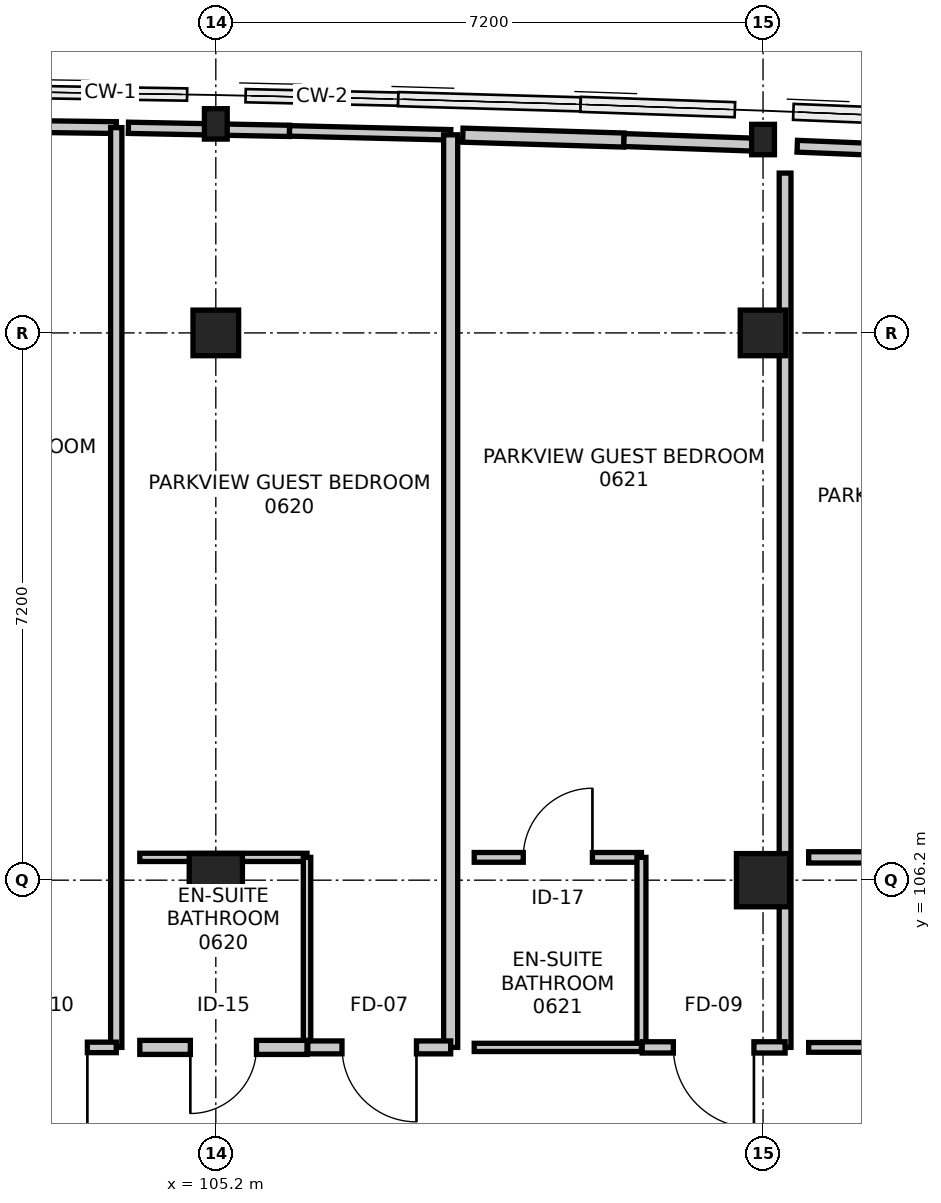
"""IFC4 building model, lengths in metres.
Left out: names, types, materials, properties, quantities, classifications, styles, units other than length and angle.
Written with IfcOpenShell. Run it as: python <this file> out.ifc"""

import sys

from ifc_helpers import new_model, si_unit, direction, frame, frame_2d, origin, origin_2d, place, context, subcontext, project, spatial, rectangle, i_section, extrude, element, fill, save


model = new_model("IFC4")
c1 = context("Model", 3, precision=1e-05, world=origin(), true_north=direction((0.0, 1.0)))
c2 = subcontext(c1, "Body", "Model", "MODEL_VIEW")
j1 = project(units=[si_unit("LENGTHUNIT", "METRE"), si_unit("PLANEANGLEUNIT", "RADIAN")], contexts=[c1])
p1 = place(None, origin())
s1 = spatial("IfcSite", under=j1, at=p1, CompositionType="ELEMENT")
p2 = place(p1, origin())
s2 = spatial("IfcBuilding", under=s1, at=p2, CompositionType="ELEMENT")
p3 = place(p2, frame((0.0, 0.0, 26.4)))
s3 = spatial("IfcBuildingStorey", under=s2, at=p3, CompositionType="ELEMENT", Elevation=26.4)
p4 = place(p3, frame((105.2, 106.2, 0.0), z_axis=(0.0, 0.0, 1.0), x_axis=(1.0, 0.0, 0.0)))
e1 = element("IfcColumn", 1, at=p4, inside=s3, PredefinedType="COLUMN", context=c2, shape_type="SweptSolid", body=[
    extrude(rectangle(XDim=0.7, YDim=0.7, at=origin_2d()), origin(), (0.0, 0.0, 1.0), 3.6),
])
p5 = place(p3, frame((105.2, 113.4, 0.0), z_axis=(0.0, 0.0, 1.0), x_axis=(1.0, 0.0, 0.0)))
e2 = element("IfcColumn", 2, at=p5, inside=s3, PredefinedType="COLUMN", context=c2, shape_type="SweptSolid", body=[
    extrude(rectangle(XDim=0.6, YDim=0.6, at=origin_2d()), origin(), (0.0, 0.0, 1.0), 3.6),
])
p6 = place(p3, frame((105.2, 116.15, 0.0), z_axis=(0.0, 0.0, 1.0), x_axis=(1.0, 0.0, 0.0)))
e3 = element("IfcColumn", 3, at=p6, inside=s3, PredefinedType="COLUMN", context=c2, shape_type="SweptSolid", body=[
    extrude(i_section(OverallWidth=0.3, OverallDepth=0.4, WebThickness=0.013, FlangeThickness=0.024, FilletRadius=0.027, at=origin_2d()), origin(), (0.0, 0.0, 1.0), 3.6),
])
p7 = place(p3, frame((112.4, 106.2, 0.0), z_axis=(0.0, 0.0, 1.0), x_axis=(1.0, 0.0, 0.0)))
e4 = element("IfcColumn", 4, at=p7, inside=s3, PredefinedType="COLUMN", context=c2, shape_type="SweptSolid", body=[
    extrude(rectangle(XDim=0.7, YDim=0.7, at=origin_2d()), origin(), (0.0, 0.0, 1.0), 3.6),
])
p8 = place(p3, frame((112.4, 113.4, 0.0), z_axis=(0.0, 0.0, 1.0), x_axis=(1.0, 0.0, 0.0)))
e5 = element("IfcColumn", 5, at=p8, inside=s3, PredefinedType="COLUMN", context=c2, shape_type="SweptSolid", body=[
    extrude(rectangle(XDim=0.6, YDim=0.6, at=origin_2d()), origin(), (0.0, 0.0, 1.0), 3.6),
])
p9 = place(p3, frame((112.4, 115.944, 0.0), z_axis=(0.0, 0.0, 1.0), x_axis=(1.0, 0.0, 0.0)))
e6 = element("IfcColumn", 6, at=p9, inside=s3, PredefinedType="COLUMN", context=c2, shape_type="SweptSolid", body=[
    extrude(i_section(OverallWidth=0.3, OverallDepth=0.4, WebThickness=0.013, FlangeThickness=0.024, FilletRadius=0.027, at=origin_2d()), origin(), (0.0, 0.0, 1.0), 3.6),
])
p10 = place(p3, frame((101.77, 116.129, 0.0), z_axis=(0.0, 0.0, 1.0), x_axis=(0.999915329499, -0.013012833379, 0.0)))
e7 = element("IfcWall", 7, at=p10, inside=s3, PredefinedType="PARTITIONING", context=c2, shape_type="SweptSolid", body=[
    extrude(rectangle(XDim=2.12, YDim=0.155, at=frame_2d((1.06, 0.0))), origin(), (0.0, 0.0, 1.0), 2.926),
])
p11 = place(p3, frame((103.89, 116.101, 0.0), z_axis=(0.0, 0.0, 1.0), x_axis=(0.0, -1.0, 0.0)))
e8 = element("IfcWall", 8, at=p11, inside=s3, PredefinedType="PARTITIONING", context=c2, shape_type="SweptSolid", body=[
    extrude(rectangle(XDim=12.101, YDim=0.148, at=frame_2d((6.051, 0.0))), origin(), (0.0, 0.0, 1.0), 2.735),
])
p12 = place(p3, frame((103.89, 104.0, 0.0), z_axis=(0.0, 0.0, 1.0), x_axis=(-1.0, 0.0, 0.0)))
e9 = element("IfcWall", 9, at=p12, inside=s3, PredefinedType="PARTITIONING", context=c2, shape_type="SweptSolid", body=[
    extrude(rectangle(XDim=1.88, YDim=0.138, at=frame_2d((0.94, 0.0))), origin(), (0.0, 0.0, 1.0), 3.35),
])
p13 = place(p12, frame((0.38, 0.0, 0.0)))
e10 = element("IfcOpeningElement", 10, at=p13, cuts=e9, PredefinedType="OPENING", context=c2, shape_type="SweptSolid", body=[
    extrude(rectangle(XDim=1.12, YDim=2.2, at=frame_2d((0.56, 1.1))), frame((0.0, 0.079, 0.0), z_axis=(0.0, -1.0, 0.0), x_axis=(1.0, 0.0, 0.0)), (0.0, 0.0, 1.0), 0.158),
])
p14 = place(p3, frame((104.2, 106.5, 0.0), z_axis=(0.0, 0.0, 1.0), x_axis=(1.0, 0.0, 0.0)))
e11 = element("IfcWall", 11, at=p14, inside=s3, PredefinedType="PARTITIONING", context=c2, shape_type="SweptSolid", body=[
    extrude(rectangle(XDim=2.2, YDim=0.108, at=frame_2d((1.1, 0.0))), origin(), (0.0, 0.0, 1.0), 2.685),
])
p15 = place(p3, frame((106.4, 106.5, 0.0), z_axis=(0.0, 0.0, 1.0), x_axis=(0.0, -1.0, 0.0)))
e12 = element("IfcWall", 12, at=p15, inside=s3, PredefinedType="PARTITIONING", context=c2, shape_type="SweptSolid", body=[
    extrude(rectangle(XDim=2.5, YDim=0.098, at=frame_2d((1.25, 0.0))), origin(), (0.0, 0.0, 1.0), 2.735),
])
p16 = place(p3, frame((106.4, 104.0, 0.0), z_axis=(0.0, 0.0, 1.0), x_axis=(-1.0, 0.0, 0.0)))
e13 = element("IfcWall", 13, at=p16, inside=s3, PredefinedType="PARTITIONING", context=c2, shape_type="SweptSolid", body=[
    extrude(rectangle(XDim=2.2, YDim=0.185, at=frame_2d((1.1, 0.0))), origin(), (0.0, 0.0, 1.0), 2.685),
])
p17 = place(p16, frame((0.665, 0.0, 0.0)))
e14 = element("IfcOpeningElement", 14, at=p17, cuts=e13, PredefinedType="OPENING", context=c2, shape_type="SweptSolid", body=[
    extrude(rectangle(XDim=0.87, YDim=2.07, at=frame_2d((0.435, 1.035))), frame((0.0, 0.103, 0.0), z_axis=(0.0, -1.0, 0.0), x_axis=(1.0, 0.0, 0.0)), (0.0, 0.0, 1.0), 0.205),
])
p18 = place(p3, frame((104.05, 116.098, 0.0), z_axis=(0.0, 0.0, 1.0), x_axis=(0.999817304626, -0.019114323686, 0.0)))
e15 = element("IfcWall", 15, at=p18, inside=s3, PredefinedType="PARTITIONING", context=c2, shape_type="SweptSolid", body=[
    extrude(rectangle(XDim=2.12, YDim=0.148, at=frame_2d((1.06, 0.0))), origin(), (0.0, 0.0, 1.0), 2.926),
])
p19 = place(p3, frame((106.17, 116.058, 0.0), z_axis=(0.0, 0.0, 1.0), x_axis=(0.999699327522, -0.024520492488, 0.0)))
e16 = element("IfcWall", 16, at=p19, inside=s3, PredefinedType="PARTITIONING", context=c2, shape_type="SweptSolid", body=[
    extrude(rectangle(XDim=2.121, YDim=0.138, at=frame_2d((1.061, 0.0))), origin(), (0.0, 0.0, 1.0), 2.926),
])
p20 = place(p3, frame((108.29, 116.006, 0.0), z_axis=(0.0, 0.0, 1.0), x_axis=(0.0, -1.0, 0.0)))
e17 = element("IfcWall", 17, at=p20, inside=s3, PredefinedType="PARTITIONING", context=c2, shape_type="SweptSolid", body=[
    extrude(rectangle(XDim=12.006, YDim=0.185, at=frame_2d((6.003, 0.0))), origin(), (0.0, 0.0, 1.0), 2.735),
])
p21 = place(p3, frame((108.29, 104.0, 0.0), z_axis=(0.0, 0.0, 1.0), x_axis=(-1.0, 0.0, 0.0)))
e18 = element("IfcWall", 18, at=p21, inside=s3, PredefinedType="PARTITIONING", context=c2, shape_type="SweptSolid", body=[
    extrude(rectangle(XDim=1.88, YDim=0.17, at=frame_2d((0.94, 0.0))), origin(), (0.0, 0.0, 1.0), 3.35),
])
p22 = place(p21, frame((0.45, 0.0, 0.0)))
e19 = element("IfcOpeningElement", 19, at=p22, cuts=e18, PredefinedType="OPENING", context=c2, shape_type="SweptSolid", body=[
    extrude(rectangle(XDim=0.98, YDim=2.15, at=frame_2d((0.49, 1.075))), frame((0.0, 0.095, 0.0), z_axis=(0.0, -1.0, 0.0), x_axis=(1.0, 0.0, 0.0)), (0.0, 0.0, 1.0), 0.19),
])
p23 = place(p3, frame((108.6, 106.5, 0.0), z_axis=(0.0, 0.0, 1.0), x_axis=(1.0, 0.0, 0.0)))
e20 = element("IfcWall", 20, at=p23, inside=s3, PredefinedType="PARTITIONING", context=c2, shape_type="SweptSolid", body=[
    extrude(rectangle(XDim=2.2, YDim=0.128, at=frame_2d((1.1, 0.0))), origin(), (0.0, 0.0, 1.0), 3.35),
])
p24 = place(p23, frame((0.645, 0.0, 0.0)))
e21 = element("IfcOpeningElement", 21, at=p24, cuts=e20, PredefinedType="OPENING", context=c2, shape_type="SweptSolid", body=[
    extrude(rectangle(XDim=0.91, YDim=2.11, at=frame_2d((0.455, 1.055))), frame((0.0, 0.074, 0.0), z_axis=(0.0, -1.0, 0.0), x_axis=(1.0, 0.0, 0.0)), (0.0, 0.0, 1.0), 0.148),
])
p25 = place(p3, frame((110.8, 106.5, 0.0), z_axis=(0.0, 0.0, 1.0), x_axis=(0.0, -1.0, 0.0)))
e22 = element("IfcWall", 22, at=p25, inside=s3, PredefinedType="PARTITIONING", context=c2, shape_type="SweptSolid", body=[
    extrude(rectangle(XDim=2.5, YDim=0.118, at=frame_2d((1.25, 0.0))), origin(), (0.0, 0.0, 1.0), 2.735),
])
p26 = place(p3, frame((110.8, 104.0, 0.0), z_axis=(0.0, 0.0, 1.0), x_axis=(-1.0, 0.0, 0.0)))
e23 = element("IfcWall", 23, at=p26, inside=s3, PredefinedType="PARTITIONING", context=c2, shape_type="SweptSolid", body=[
    extrude(rectangle(XDim=2.2, YDim=0.108, at=frame_2d((1.1, 0.0))), origin(), (0.0, 0.0, 1.0), 3.35),
])
p27 = place(p3, frame((108.45, 116.001, 0.0), z_axis=(0.0, 0.0, 1.0), x_axis=(0.999545183102, -0.030156706353, 0.0)))
e24 = element("IfcWall", 24, at=p27, inside=s3, PredefinedType="PARTITIONING", context=c2, shape_type="SweptSolid", body=[
    extrude(rectangle(XDim=2.121, YDim=0.185, at=frame_2d((1.061, 0.0))), origin(), (0.0, 0.0, 1.0), 2.926),
])
p28 = place(p3, frame((110.57, 115.937, 0.0), z_axis=(0.0, 0.0, 1.0), x_axis=(0.999375154514, -0.035345445825, 0.0)))
e25 = element("IfcWall", 25, at=p28, inside=s3, PredefinedType="PARTITIONING", context=c2, shape_type="SweptSolid", body=[
    extrude(rectangle(XDim=1.761, YDim=0.17, at=frame_2d((0.881, 0.0))), origin(), (0.0, 0.0, 1.0), 2.926),
])
p29 = place(p3, frame((112.69, 115.502, 0.0), z_axis=(0.0, 0.0, 1.0), x_axis=(0.0, -1.0, 0.0)))
e26 = element("IfcWall", 26, at=p29, inside=s3, PredefinedType="PARTITIONING", context=c2, shape_type="SweptSolid", body=[
    extrude(rectangle(XDim=11.502, YDim=0.155, at=frame_2d((5.751, 0.0))), origin(), (0.0, 0.0, 1.0), 2.685),
])
p30 = place(p3, frame((112.69, 104.0, 0.0), z_axis=(0.0, 0.0, 1.0), x_axis=(-1.0, 0.0, 0.0)))
e27 = element("IfcWall", 27, at=p30, inside=s3, PredefinedType="PARTITIONING", context=c2, shape_type="SweptSolid", body=[
    extrude(rectangle(XDim=1.88, YDim=0.148, at=frame_2d((0.94, 0.0))), origin(), (0.0, 0.0, 1.0), 2.685),
])
p31 = place(p30, frame((0.41, 0.0, 0.0)))
e28 = element("IfcOpeningElement", 28, at=p31, cuts=e27, PredefinedType="OPENING", context=c2, shape_type="SweptSolid", body=[
    extrude(rectangle(XDim=1.06, YDim=2.2, at=frame_2d((0.53, 1.1))), frame((0.0, 0.084, 0.0), z_axis=(0.0, -1.0, 0.0), x_axis=(1.0, 0.0, 0.0)), (0.0, 0.0, 1.0), 0.168),
])
p32 = place(p3, frame((113.0, 106.5, 0.0), z_axis=(0.0, 0.0, 1.0), x_axis=(1.0, 0.0, 0.0)))
e29 = element("IfcWall", 29, at=p32, inside=s3, PredefinedType="PARTITIONING", context=c2, shape_type="SweptSolid", body=[
    extrude(rectangle(XDim=2.2, YDim=0.148, at=frame_2d((1.1, 0.0))), origin(), (0.0, 0.0, 1.0), 3.35),
])
p33 = place(p3, frame((115.2, 104.0, 0.0), z_axis=(0.0, 0.0, 1.0), x_axis=(-1.0, 0.0, 0.0)))
e30 = element("IfcWall", 30, at=p33, inside=s3, PredefinedType="PARTITIONING", context=c2, shape_type="SweptSolid", body=[
    extrude(rectangle(XDim=2.2, YDim=0.128, at=frame_2d((1.1, 0.0))), origin(), (0.0, 0.0, 1.0), 3.35),
])
p34 = place(p3, frame((112.85, 115.856, 0.0), z_axis=(0.0, 0.0, 1.0), x_axis=(0.999174642918, -0.040620597599, 0.0)))
e31 = element("IfcWall", 31, at=p34, inside=s3, PredefinedType="PARTITIONING", context=c2, shape_type="SweptSolid", body=[
    extrude(rectangle(XDim=2.122, YDim=0.155, at=frame_2d((1.061, 0.0))), origin(), (0.0, 0.0, 1.0), 2.926),
])
p35 = place(p13, origin())
e32 = element("IfcDoor", 32, at=p35, inside=s3, OperationType="SINGLE_SWING_LEFT", PredefinedType="DOOR", context=c2, shape_type="SweptSolid", body=[
    extrude(rectangle(XDim=1.12, YDim=2.2, at=frame_2d((0.56, 1.1))), frame((0.0, 0.025, 0.0), z_axis=(0.0, -1.0, 0.0), x_axis=(1.0, 0.0, 0.0)), (0.0, 0.0, 1.0), 0.05),
])
fill(e10, e32)
p36 = place(p17, origin())
e33 = element("IfcDoor", 33, at=p36, inside=s3, OperationType="SINGLE_SWING_RIGHT", PredefinedType="DOOR", context=c2, shape_type="SweptSolid", body=[
    extrude(rectangle(XDim=0.87, YDim=2.07, at=frame_2d((0.435, 1.035))), frame((0.0, 0.025, 0.0), z_axis=(0.0, -1.0, 0.0), x_axis=(1.0, 0.0, 0.0)), (0.0, 0.0, 1.0), 0.05),
])
fill(e14, e33)
p37 = place(p22, origin())
e34 = element("IfcDoor", 34, at=p37, inside=s3, OperationType="SINGLE_SWING_LEFT", PredefinedType="DOOR", context=c2, shape_type="SweptSolid", body=[
    extrude(rectangle(XDim=0.98, YDim=2.15, at=frame_2d((0.49, 1.075))), frame((0.0, 0.025, 0.0), z_axis=(0.0, -1.0, 0.0), x_axis=(1.0, 0.0, 0.0)), (0.0, 0.0, 1.0), 0.05),
])
fill(e19, e34)
p38 = place(p24, origin())
e35 = element("IfcDoor", 35, at=p38, inside=s3, OperationType="SINGLE_SWING_RIGHT", PredefinedType="DOOR", context=c2, shape_type="SweptSolid", body=[
    extrude(rectangle(XDim=0.91, YDim=2.11, at=frame_2d((0.455, 1.055))), frame((0.0, 0.025, 0.0), z_axis=(0.0, -1.0, 0.0), x_axis=(1.0, 0.0, 0.0)), (0.0, 0.0, 1.0), 0.05),
])
fill(e21, e35)
p39 = place(p31, origin())
e36 = element("IfcDoor", 36, at=p39, inside=s3, OperationType="SINGLE_SWING_LEFT", PredefinedType="DOOR", context=c2, shape_type="SweptSolid", body=[
    extrude(rectangle(XDim=1.06, YDim=2.2, at=frame_2d((0.53, 1.1))), frame((0.0, 0.025, 0.0), z_axis=(0.0, -1.0, 0.0), x_axis=(1.0, 0.0, 0.0)), (0.0, 0.0, 1.0), 0.05),
])
fill(e28, e36)
save(model, sys.argv[1])
